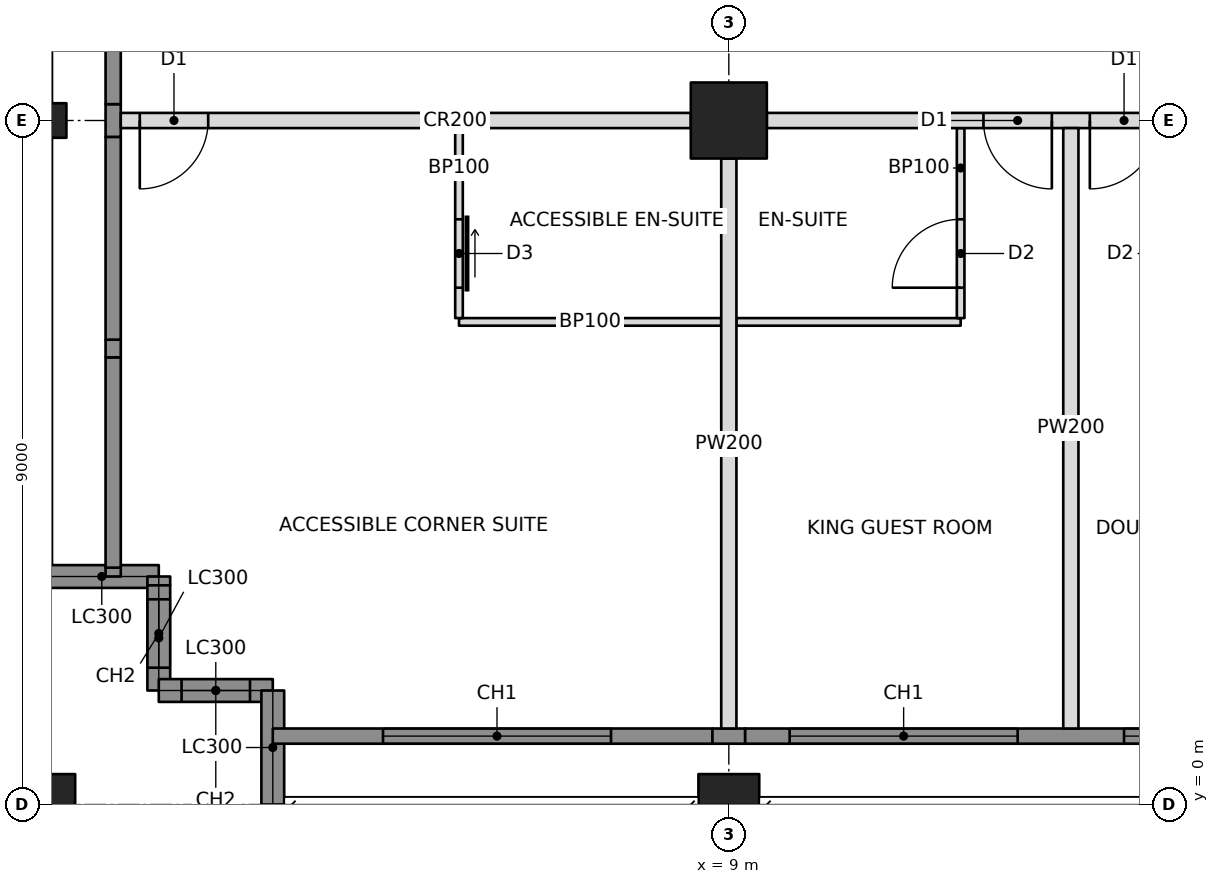
"""IFC4 building model, lengths in metres.
Left out: names, types, materials, properties, quantities, classifications, styles, units other than length and angle.
Written with IfcOpenShell. Run it as: python <this file> out.ifc"""

import sys

from ifc_helpers import new_model, si_unit, direction, frame, frame_2d, origin, origin_with_axes, origin_2d, place, context, subcontext, project, spatial, rectangle, hollow_rectangle, i_section, extrude, element, fill, save


model = new_model("IFC4")
c1 = context("Model", 3, precision=1e-05, world=origin(), true_north=direction((0.0, 1.0)))
c2 = subcontext(c1, "Body", "Model", "MODEL_VIEW")
j1 = project(units=[si_unit("LENGTHUNIT", "METRE"), si_unit("PLANEANGLEUNIT", "RADIAN")], contexts=[c1])
p1 = place(None, origin())
s1 = spatial("IfcSite", under=j1, at=p1, CompositionType="ELEMENT")
p2 = place(p1, origin())
s2 = spatial("IfcBuilding", under=s1, at=p2, CompositionType="ELEMENT")
p3 = place(p2, frame((0.0, 0.0, 85.8)))
s3 = spatial("IfcBuildingStorey", under=s2, at=p3, CompositionType="ELEMENT", Elevation=85.8)
p4 = place(p3, origin_with_axes())
e1 = element("IfcColumn", 1, at=p4, inside=s3, PredefinedType="COLUMN", context=c2, shape_type="SweptSolid", body=[
    extrude(hollow_rectangle(XDim=0.8, YDim=0.8, WallThickness=0.07, at=origin_2d()), origin(), (0.0, 0.0, 1.0), 3.4),
])
p5 = place(p3, frame((0.0, 9.0, 0.0), z_axis=(0.0, 0.0, 1.0), x_axis=(0.0, 1.0, 0.0)))
e2 = element("IfcColumn", 2, at=p5, inside=s3, PredefinedType="COLUMN", context=c2, shape_type="SweptSolid", body=[
    extrude(i_section(OverallWidth=0.455, OverallDepth=0.569, WebThickness=0.078, FlangeThickness=0.125, at=origin_2d()), origin(), (0.0, 0.0, 1.0), 3.4),
])
p6 = place(p3, frame((9.0, 0.0, 0.0), z_axis=(0.0, 0.0, 1.0), x_axis=(1.0, 0.0, 0.0)))
e3 = element("IfcColumn", 3, at=p6, inside=s3, PredefinedType="COLUMN", context=c2, shape_type="SweptSolid", body=[
    extrude(hollow_rectangle(XDim=0.8, YDim=0.8, WallThickness=0.07, at=origin_2d()), origin(), (0.0, 0.0, 1.0), 3.4),
])
p7 = place(p3, frame((9.0, 9.0, 0.0), z_axis=(0.0, 0.0, 1.0), x_axis=(1.0, 0.0, 0.0)))
e4 = element("IfcColumn", 4, at=p7, inside=s3, PredefinedType="COLUMN", context=c2, shape_type="SweptSolid", body=[
    extrude(hollow_rectangle(XDim=1.0, YDim=1.0, WallThickness=0.1, at=origin_2d()), origin(), (0.0, 0.0, 1.0), 3.4),
])
p8 = place(p3, frame((0.0, 3.0, 0.0), z_axis=(0.0, 0.0, 1.0), x_axis=(1.0, 0.0, 0.0)))
e5 = element("IfcWall", 5, at=p8, inside=s3, PredefinedType="SOLIDWALL", context=c2, shape_type="SweptSolid", body=[
    extrude(rectangle(XDim=1.5, YDim=0.3, at=frame_2d((0.75, 0.0))), origin(), (0.0, 0.0, 1.0), 2.202),
])
p9 = place(p3, frame((1.5, 3.0, 0.0), z_axis=(0.0, 0.0, 1.0), x_axis=(0.0, -1.0, 0.0)))
e6 = element("IfcWall", 6, at=p9, inside=s3, PredefinedType="SOLIDWALL", context=c2, shape_type="SweptSolid", body=[
    extrude(rectangle(XDim=0.116, YDim=0.3, at=frame_2d((0.058, 0.0))), origin(), (0.0, 0.0, 1.0), 2.542),
])
p10 = place(p3, frame((1.5, 1.5, 0.0), z_axis=(0.0, 0.0, 1.0), x_axis=(1.0, 0.0, 0.0)))
e7 = element("IfcWall", 7, at=p10, inside=s3, PredefinedType="SOLIDWALL", context=c2, shape_type="SweptSolid", body=[
    extrude(rectangle(XDim=1.5, YDim=0.3, at=frame_2d((0.75, 0.0))), origin(), (0.0, 0.0, 1.0), 3.15),
])
p11 = place(p10, frame((0.3, 0.0, 0.6)))
e8 = element("IfcOpeningElement", 8, at=p11, cuts=e7, PredefinedType="OPENING", context=c2, shape_type="SweptSolid", body=[
    extrude(rectangle(XDim=0.9, YDim=2.2, at=frame_2d((0.45, 1.1))), frame((0.0, 0.16, 0.0), z_axis=(0.0, -1.0, 0.0), x_axis=(1.0, 0.0, 0.0)), (0.0, 0.0, 1.0), 0.32),
])
p12 = place(p3, frame((3.0, 1.5, 0.0), z_axis=(0.0, 0.0, 1.0), x_axis=(0.0, -1.0, 0.0)))
e9 = element("IfcWall", 9, at=p12, inside=s3, PredefinedType="SOLIDWALL", context=c2, shape_type="SweptSolid", body=[
    extrude(rectangle(XDim=1.5, YDim=0.3, at=frame_2d((0.75, 0.0))), origin(), (0.0, 0.0, 1.0), 2.202),
])
p13 = place(p3, frame((3.0, 0.9, 0.0), z_axis=(0.0, 0.0, 1.0), x_axis=(1.0, 0.0, 0.0)))
e10 = element("IfcWall", 10, at=p13, inside=s3, PredefinedType="SOLIDWALL", context=c2, shape_type="SweptSolid", body=[
    extrude(rectangle(XDim=5.785, YDim=0.2, at=frame_2d((2.892, 0.0))), origin(), (0.0, 0.0, 1.0), 3.15),
])
p14 = place(p13, frame((1.45, 0.0, 0.6)))
e11 = element("IfcOpeningElement", 11, at=p14, cuts=e10, PredefinedType="OPENING", context=c2, shape_type="SweptSolid", body=[
    extrude(rectangle(XDim=3.0, YDim=2.2, at=frame_2d((1.5, 1.1))), frame((0.0, 0.11, 0.0), z_axis=(0.0, -1.0, 0.0), x_axis=(1.0, 0.0, 0.0)), (0.0, 0.0, 1.0), 0.22),
])
p15 = place(p3, frame((0.9, 3.0, 0.0), z_axis=(0.0, 0.0, 1.0), x_axis=(0.0, 1.0, 0.0)))
e12 = element("IfcWall", 12, at=p15, inside=s3, PredefinedType="SOLIDWALL", context=c2, shape_type="SweptSolid", body=[
    extrude(rectangle(XDim=0.116, YDim=0.2, at=frame_2d((0.058, 0.0))), origin(), (0.0, 0.0, 1.0), 2.542),
])
p16 = place(p3, frame((1.0, 9.0, 0.0), z_axis=(0.0, 0.0, 1.0), x_axis=(1.0, 0.0, 0.0)))
e13 = element("IfcWall", 13, at=p16, inside=s3, PredefinedType="PARTITIONING", context=c2, shape_type="SweptSolid", body=[
    extrude(rectangle(XDim=7.5, YDim=0.2, at=frame_2d((3.75, 0.0))), origin(), (0.0, 0.0, 1.0), 2.21),
])
p17 = place(p16, frame((0.25, 0.0, 0.0)))
e14 = element("IfcOpeningElement", 14, at=p17, cuts=e13, PredefinedType="OPENING", context=c2, shape_type="SweptSolid", body=[
    extrude(rectangle(XDim=0.9, YDim=2.1, at=frame_2d((0.45, 1.05))), frame((0.0, 0.11, 0.0), z_axis=(0.0, -1.0, 0.0), x_axis=(1.0, 0.0, 0.0)), (0.0, 0.0, 1.0), 0.22),
])
p18 = place(p3, frame((9.5, 9.0, 0.0), z_axis=(0.0, 0.0, 1.0), x_axis=(1.0, 0.0, 0.0)))
e15 = element("IfcWall", 15, at=p18, inside=s3, PredefinedType="PARTITIONING", context=c2, shape_type="SweptSolid", body=[
    extrude(rectangle(XDim=8.0, YDim=0.2, at=frame_2d((4.0, 0.0))), origin(), (0.0, 0.0, 1.0), 2.21),
])
p19 = place(p18, frame((2.85, 0.0, 0.0)))
e16 = element("IfcOpeningElement", 16, at=p19, cuts=e15, PredefinedType="OPENING", context=c2, shape_type="SweptSolid", body=[
    extrude(rectangle(XDim=0.9, YDim=2.1, at=frame_2d((0.45, 1.05))), frame((0.0, 0.11, 0.0), z_axis=(0.0, -1.0, 0.0), x_axis=(1.0, 0.0, 0.0)), (0.0, 0.0, 1.0), 0.22),
])
p20 = place(p18, frame((4.25, 0.0, 0.0)))
e17 = element("IfcOpeningElement", 17, at=p20, cuts=e15, PredefinedType="OPENING", context=c2, shape_type="SweptSolid", body=[
    extrude(rectangle(XDim=0.9, YDim=2.1, at=frame_2d((0.45, 1.05))), frame((0.0, 0.11, 0.0), z_axis=(0.0, -1.0, 0.0), x_axis=(1.0, 0.0, 0.0)), (0.0, 0.0, 1.0), 0.22),
])
p21 = place(p3, frame((9.0, 8.5, 0.0), z_axis=(0.0, 0.0, 1.0), x_axis=(0.0, -1.0, 0.0)))
e18 = element("IfcWall", 18, at=p21, inside=s3, PredefinedType="PARTITIONING", context=c2, shape_type="SweptSolid", body=[
    extrude(rectangle(XDim=7.5, YDim=0.2, at=frame_2d((3.75, 0.0))), origin(), (0.0, 0.0, 1.0), 2.21),
])
p22 = place(p3, frame((13.5, 8.9, 0.0), z_axis=(0.0, 0.0, 1.0), x_axis=(0.0, -1.0, 0.0)))
e19 = element("IfcWall", 19, at=p22, inside=s3, PredefinedType="PARTITIONING", context=c2, shape_type="SweptSolid", body=[
    extrude(rectangle(XDim=7.9, YDim=0.2, at=frame_2d((3.95, 0.0))), origin(), (0.0, 0.0, 1.0), 2.21),
])
p23 = place(p3, frame((5.45, 6.35, 0.0), z_axis=(0.0, 0.0, 1.0), x_axis=(1.0, 0.0, 0.0)))
e20 = element("IfcWall", 20, at=p23, inside=s3, PredefinedType="PARTITIONING", context=c2, shape_type="SweptSolid", body=[
    extrude(rectangle(XDim=3.45, YDim=0.1, at=frame_2d((1.725, 0.0))), origin(), (0.0, 0.0, 1.0), 2.21),
])
p24 = place(p3, frame((5.45, 8.9, 0.0), z_axis=(0.0, 0.0, 1.0), x_axis=(0.0, -1.0, 0.0)))
e21 = element("IfcWall", 21, at=p24, inside=s3, PredefinedType="PARTITIONING", context=c2, shape_type="SweptSolid", body=[
    extrude(rectangle(XDim=2.5, YDim=0.1, at=frame_2d((1.25, 0.0))), origin(), (0.0, 0.0, 1.0), 2.21),
])
p25 = place(p24, frame((1.2, 0.0, 0.0)))
e22 = element("IfcOpeningElement", 22, at=p25, cuts=e21, PredefinedType="OPENING", context=c2, shape_type="SweptSolid", body=[
    extrude(rectangle(XDim=0.9, YDim=2.1, at=frame_2d((0.45, 1.05))), frame((0.0, 0.06, 0.0), z_axis=(0.0, -1.0, 0.0), x_axis=(1.0, 0.0, 0.0)), (0.0, 0.0, 1.0), 0.12),
])
p26 = place(p3, frame((9.1, 6.35, 0.0), z_axis=(0.0, 0.0, 1.0), x_axis=(1.0, 0.0, 0.0)))
e23 = element("IfcWall", 23, at=p26, inside=s3, PredefinedType="PARTITIONING", context=c2, shape_type="SweptSolid", body=[
    extrude(rectangle(XDim=2.95, YDim=0.1, at=frame_2d((1.475, 0.0))), origin(), (0.0, 0.0, 1.0), 2.21),
])
p27 = place(p3, frame((12.05, 8.9, 0.0), z_axis=(0.0, 0.0, 1.0), x_axis=(0.0, -1.0, 0.0)))
e24 = element("IfcWall", 24, at=p27, inside=s3, PredefinedType="PARTITIONING", context=c2, shape_type="SweptSolid", body=[
    extrude(rectangle(XDim=2.5, YDim=0.1, at=frame_2d((1.25, 0.0))), origin(), (0.0, 0.0, 1.0), 2.21),
])
p28 = place(p27, frame((1.2, 0.0, 0.0)))
e25 = element("IfcOpeningElement", 25, at=p28, cuts=e24, PredefinedType="OPENING", context=c2, shape_type="SweptSolid", body=[
    extrude(rectangle(XDim=0.9, YDim=2.1, at=frame_2d((0.45, 1.05))), frame((0.0, 0.06, 0.0), z_axis=(0.0, -1.0, 0.0), x_axis=(1.0, 0.0, 0.0)), (0.0, 0.0, 1.0), 0.12),
])
p29 = place(p3, frame((1.5, 2.884, 0.0), z_axis=(0.0, 0.0, 1.0), x_axis=(0.0, -1.0, 0.0)))
e26 = element("IfcWall", 26, at=p29, inside=s3, PredefinedType="SOLIDWALL", context=c2, shape_type="SweptSolid", body=[
    extrude(rectangle(XDim=1.384, YDim=0.3, at=frame_2d((0.692, 0.0))), origin(), (0.0, 0.0, 1.0), 3.15),
])
p30 = place(p29, frame((0.184, 0.0, 0.6)))
e27 = element("IfcOpeningElement", 27, at=p30, cuts=e26, PredefinedType="OPENING", context=c2, shape_type="SweptSolid", body=[
    extrude(rectangle(XDim=0.9, YDim=2.2, at=frame_2d((0.45, 1.1))), frame((0.0, 0.16, 0.0), z_axis=(0.0, -1.0, 0.0), x_axis=(1.0, 0.0, 0.0)), (0.0, 0.0, 1.0), 0.32),
])
p31 = place(p3, frame((8.785, 0.9, 0.0), z_axis=(0.0, 0.0, 1.0), x_axis=(1.0, 0.0, 0.0)))
e28 = element("IfcWall", 28, at=p31, inside=s3, PredefinedType="SOLIDWALL", context=c2, shape_type="SweptSolid", body=[
    extrude(rectangle(XDim=0.431, YDim=0.2, at=frame_2d((0.215, 0.0))), origin(), (0.0, 0.0, 1.0), 2.21),
])
p32 = place(p3, frame((9.215, 0.9, 0.0), z_axis=(0.0, 0.0, 1.0), x_axis=(1.0, 0.0, 0.0)))
e29 = element("IfcWall", 29, at=p32, inside=s3, PredefinedType="SOLIDWALL", context=c2, shape_type="SweptSolid", body=[
    extrude(rectangle(XDim=8.571, YDim=0.2, at=frame_2d((4.285, 0.0))), origin(), (0.0, 0.0, 1.0), 3.15),
])
p33 = place(p32, frame((0.585, 0.0, 0.6)))
e30 = element("IfcOpeningElement", 30, at=p33, cuts=e29, PredefinedType="OPENING", context=c2, shape_type="SweptSolid", body=[
    extrude(rectangle(XDim=3.0, YDim=2.2, at=frame_2d((1.5, 1.1))), frame((0.0, 0.11, 0.0), z_axis=(0.0, -1.0, 0.0), x_axis=(1.0, 0.0, 0.0)), (0.0, 0.0, 1.0), 0.22),
])
p34 = place(p32, frame((4.985, 0.0, 0.6)))
e31 = element("IfcOpeningElement", 31, at=p34, cuts=e29, PredefinedType="OPENING", context=c2, shape_type="SweptSolid", body=[
    extrude(rectangle(XDim=3.0, YDim=2.2, at=frame_2d((1.5, 1.1))), frame((0.0, 0.11, 0.0), z_axis=(0.0, -1.0, 0.0), x_axis=(1.0, 0.0, 0.0)), (0.0, 0.0, 1.0), 0.22),
])
p35 = place(p3, frame((0.9, 3.116, 0.0), z_axis=(0.0, 0.0, 1.0), x_axis=(0.0, 1.0, 0.0)))
e32 = element("IfcWall", 32, at=p35, inside=s3, PredefinedType="SOLIDWALL", context=c2, shape_type="SweptSolid", body=[
    extrude(rectangle(XDim=2.768, YDim=0.2, at=frame_2d((1.384, 0.0))), origin(), (0.0, 0.0, 1.0), 3.15),
])
p36 = place(p3, frame((0.9, 5.884, 0.0), z_axis=(0.0, 0.0, 1.0), x_axis=(0.0, 1.0, 0.0)))
e33 = element("IfcWall", 33, at=p36, inside=s3, PredefinedType="SOLIDWALL", context=c2, shape_type="SweptSolid", body=[
    extrude(rectangle(XDim=0.232, YDim=0.2, at=frame_2d((0.116, 0.0))), origin(), (0.0, 0.0, 1.0), 2.542),
])
p37 = place(p3, frame((0.9, 6.116, 0.0), z_axis=(0.0, 0.0, 1.0), x_axis=(0.0, 1.0, 0.0)))
e34 = element("IfcWall", 34, at=p37, inside=s3, PredefinedType="SOLIDWALL", context=c2, shape_type="SweptSolid", body=[
    extrude(rectangle(XDim=2.668, YDim=0.2, at=frame_2d((1.334, 0.0))), origin(), (0.0, 0.0, 1.0), 3.15),
])
p38 = place(p3, frame((0.9, 8.785, 0.0), z_axis=(0.0, 0.0, 1.0), x_axis=(0.0, 1.0, 0.0)))
e35 = element("IfcWall", 35, at=p38, inside=s3, PredefinedType="SOLIDWALL", context=c2, shape_type="SweptSolid", body=[
    extrude(rectangle(XDim=0.431, YDim=0.2, at=frame_2d((0.215, 0.0))), origin(), (0.0, 0.0, 1.0), 2.21),
])
p39 = place(p3, frame((0.9, 9.215, 0.0), z_axis=(0.0, 0.0, 1.0), x_axis=(0.0, 1.0, 0.0)))
e36 = element("IfcWall", 36, at=p39, inside=s3, PredefinedType="SOLIDWALL", context=c2, shape_type="SweptSolid", body=[
    extrude(rectangle(XDim=8.571, YDim=0.2, at=frame_2d((4.285, 0.0))), origin(), (0.0, 0.0, 1.0), 3.15),
])
p40 = place(p39, frame((1.935, 0.0, 0.6)))
e37 = element("IfcOpeningElement", 37, at=p40, cuts=e36, PredefinedType="OPENING", context=c2, shape_type="SweptSolid", body=[
    extrude(rectangle(XDim=3.0, YDim=2.2, at=frame_2d((1.5, 1.1))), frame((0.0, 0.11, 0.0), z_axis=(0.0, -1.0, 0.0), x_axis=(1.0, 0.0, 0.0)), (0.0, 0.0, 1.0), 0.22),
])
p41 = place(p39, frame((5.435, 0.0, 0.6)))
e38 = element("IfcOpeningElement", 38, at=p41, cuts=e36, PredefinedType="OPENING", context=c2, shape_type="SweptSolid", body=[
    extrude(rectangle(XDim=3.0, YDim=2.2, at=frame_2d((1.5, 1.1))), frame((0.0, 0.11, 0.0), z_axis=(0.0, -1.0, 0.0), x_axis=(1.0, 0.0, 0.0)), (0.0, 0.0, 1.0), 0.22),
])
p42 = place(p30, origin())
e39 = element("IfcWindow", 39, at=p42, inside=s3, PartitioningType="SINGLE_PANEL", PredefinedType="WINDOW", context=c2, shape_type="SweptSolid", body=[
    extrude(rectangle(XDim=0.9, YDim=2.2, at=frame_2d((0.45, 1.1))), frame((0.0, 0.03, 0.0), z_axis=(0.0, -1.0, 0.0), x_axis=(1.0, 0.0, 0.0)), (0.0, 0.0, 1.0), 0.06),
])
fill(e27, e39)
p43 = place(p11, origin())
e40 = element("IfcWindow", 40, at=p43, inside=s3, PartitioningType="SINGLE_PANEL", PredefinedType="WINDOW", context=c2, shape_type="SweptSolid", body=[
    extrude(rectangle(XDim=0.9, YDim=2.2, at=frame_2d((0.45, 1.1))), frame((0.0, 0.03, 0.0), z_axis=(0.0, -1.0, 0.0), x_axis=(1.0, 0.0, 0.0)), (0.0, 0.0, 1.0), 0.06),
])
fill(e8, e40)
p44 = place(p14, origin())
e41 = element("IfcWindow", 41, at=p44, inside=s3, PartitioningType="TRIPLE_PANEL_VERTICAL", PredefinedType="WINDOW", context=c2, shape_type="SweptSolid", body=[
    extrude(rectangle(XDim=3.0, YDim=2.2, at=frame_2d((1.5, 1.1))), frame((0.0, 0.03, 0.0), z_axis=(0.0, -1.0, 0.0), x_axis=(1.0, 0.0, 0.0)), (0.0, 0.0, 1.0), 0.06),
])
fill(e11, e41)
p45 = place(p33, origin())
e42 = element("IfcWindow", 42, at=p45, inside=s3, PartitioningType="TRIPLE_PANEL_VERTICAL", PredefinedType="WINDOW", context=c2, shape_type="SweptSolid", body=[
    extrude(rectangle(XDim=3.0, YDim=2.2, at=frame_2d((1.5, 1.1))), frame((0.0, 0.03, 0.0), z_axis=(0.0, -1.0, 0.0), x_axis=(1.0, 0.0, 0.0)), (0.0, 0.0, 1.0), 0.06),
])
fill(e30, e42)
p46 = place(p34, origin())
e43 = element("IfcWindow", 43, at=p46, inside=s3, PartitioningType="TRIPLE_PANEL_VERTICAL", PredefinedType="WINDOW", context=c2, shape_type="SweptSolid", body=[
    extrude(rectangle(XDim=3.0, YDim=2.2, at=frame_2d((1.5, 1.1))), frame((0.0, 0.03, 0.0), z_axis=(0.0, -1.0, 0.0), x_axis=(1.0, 0.0, 0.0)), (0.0, 0.0, 1.0), 0.06),
])
fill(e31, e43)
p47 = place(p25, origin())
e44 = element("IfcDoor", 44, at=p47, inside=s3, OperationType="SLIDING_TO_LEFT", PredefinedType="DOOR", context=c2, shape_type="SweptSolid", body=[
    extrude(rectangle(XDim=0.9, YDim=2.1, at=frame_2d((0.45, 1.05))), frame((0.0, 0.025, 0.0), z_axis=(0.0, -1.0, 0.0), x_axis=(1.0, 0.0, 0.0)), (0.0, 0.0, 1.0), 0.05),
])
fill(e22, e44)
p48 = place(p17, frame((0.9, 0.0, 0.0), z_axis=(0.0, 0.0, 1.0), x_axis=(-1.0, 0.0, 0.0)))
e45 = element("IfcDoor", 45, at=p48, inside=s3, OperationType="SINGLE_SWING_RIGHT", PredefinedType="DOOR", context=c2, shape_type="SweptSolid", body=[
    extrude(rectangle(XDim=0.9, YDim=2.1, at=frame_2d((0.45, 1.05))), frame((0.0, 0.025, 0.0), z_axis=(0.0, -1.0, 0.0), x_axis=(1.0, 0.0, 0.0)), (0.0, 0.0, 1.0), 0.05),
])
fill(e14, e45)
p49 = place(p28, frame((0.9, 0.0, 0.0), z_axis=(0.0, 0.0, 1.0), x_axis=(-1.0, 0.0, 0.0)))
e46 = element("IfcDoor", 46, at=p49, inside=s3, OperationType="SINGLE_SWING_LEFT", PredefinedType="DOOR", context=c2, shape_type="SweptSolid", body=[
    extrude(rectangle(XDim=0.9, YDim=2.1, at=frame_2d((0.45, 1.05))), frame((0.0, 0.025, 0.0), z_axis=(0.0, -1.0, 0.0), x_axis=(1.0, 0.0, 0.0)), (0.0, 0.0, 1.0), 0.05),
])
fill(e25, e46)
p50 = place(p19, frame((0.9, 0.0, 0.0), z_axis=(0.0, 0.0, 1.0), x_axis=(-1.0, 0.0, 0.0)))
e47 = element("IfcDoor", 47, at=p50, inside=s3, OperationType="SINGLE_SWING_LEFT", PredefinedType="DOOR", context=c2, shape_type="SweptSolid", body=[
    extrude(rectangle(XDim=0.9, YDim=2.1, at=frame_2d((0.45, 1.05))), frame((0.0, 0.025, 0.0), z_axis=(0.0, -1.0, 0.0), x_axis=(1.0, 0.0, 0.0)), (0.0, 0.0, 1.0), 0.05),
])
fill(e16, e47)
p51 = place(p20, frame((0.9, 0.0, 0.0), z_axis=(0.0, 0.0, 1.0), x_axis=(-1.0, 0.0, 0.0)))
e48 = element("IfcDoor", 48, at=p51, inside=s3, OperationType="SINGLE_SWING_RIGHT", PredefinedType="DOOR", context=c2, shape_type="SweptSolid", body=[
    extrude(rectangle(XDim=0.9, YDim=2.1, at=frame_2d((0.45, 1.05))), frame((0.0, 0.025, 0.0), z_axis=(0.0, -1.0, 0.0), x_axis=(1.0, 0.0, 0.0)), (0.0, 0.0, 1.0), 0.05),
])
fill(e17, e48)
save(model, sys.argv[1])
